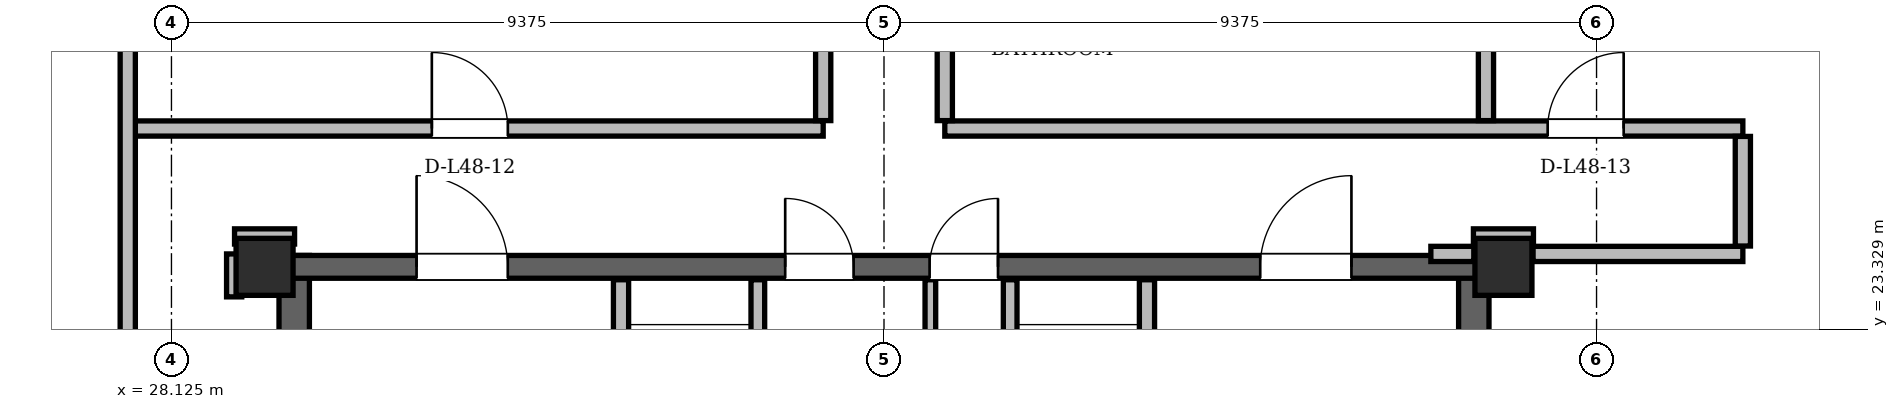
"""IFC4 building model, lengths in metres.
Left out: names, types, materials, properties, quantities, classifications, styles, units other than length and angle.
Written with IfcOpenShell. Run it as: python <this file> out.ifc"""

import sys

from ifc_helpers import new_model, si_unit, direction, frame, frame_2d, origin, origin_2d, place, context, subcontext, project, spatial, rectangle, hollow_rectangle, extrude, element, fill, save


model = new_model("IFC4")
c1 = context("Model", 3, precision=1e-05, world=origin(), true_north=direction((0.0, 1.0)))
c2 = subcontext(c1, "Body", "Model", "MODEL_VIEW")
j1 = project(units=[si_unit("LENGTHUNIT", "METRE"), si_unit("PLANEANGLEUNIT", "RADIAN")], contexts=[c1])
p1 = place(None, origin())
s1 = spatial("IfcSite", under=j1, at=p1, CompositionType="ELEMENT")
p2 = place(p1, origin())
s2 = spatial("IfcBuilding", under=s1, at=p2, CompositionType="ELEMENT")
p3 = place(p2, frame((0.0, 0.0, 181.8)))
s3 = spatial("IfcBuildingStorey", under=s2, at=p3, CompositionType="ELEMENT", Elevation=181.8)
for number, where, z_axis, x_axis in (
    (1, (45.65, 24.15, 0.0), (0.0, 0.0, 1.0), (1.0, 0.0, 0.0)),
    (2, (29.35, 24.15, 0.0), (0.0, 0.0, 1.0), (1.0, 0.0, 0.0)),
):
    element("IfcColumn", number, at=place(p3, frame(where, z_axis=z_axis, x_axis=x_axis)), inside=s3, PredefinedType="COLUMN", context=c2, shape_type="SweptSolid", body=[
        extrude(hollow_rectangle(XDim=0.75, YDim=0.75, WallThickness=0.06, at=origin_2d()), origin(), (0.0, 0.0, 1.0), 3.6),
    ])
for number, where, z_axis, x_axis in (
    (3, (29.74, 11.0, 0.0), (0.0, 0.0, 1.0), (0.0, 1.0, 0.0)),
    (4, (45.26, 11.0, 0.0), (0.0, 0.0, 1.0), (0.0, 1.0, 0.0)),
):
    element("IfcWall", number, at=place(p3, frame(where, z_axis=z_axis, x_axis=x_axis)), inside=s3, PredefinedType="SHEAR", context=c2, shape_type="SweptSolid", body=[
        extrude(rectangle(XDim=13.3, YDim=0.4, at=frame_2d((6.65, 0.0))), origin(), (0.0, 0.0, 1.0), 3.38),
    ])
p4 = place(p3, frame((29.65, 24.15, 0.0), z_axis=(0.0, 0.0, 1.0), x_axis=(1.0, 0.0, 0.0)))
e5 = element("IfcWall", 5, at=p4, inside=s3, PredefinedType="SHEAR", context=c2, shape_type="SweptSolid", body=[
    extrude(rectangle(XDim=15.7, YDim=0.3, at=frame_2d((7.85, 0.0))), origin(), (0.0, 0.0, 1.0), 3.38),
])
p5 = place(p4, frame((1.7, 0.0, 0.0)))
e6 = element("IfcOpeningElement", 6, at=p5, cuts=e5, PredefinedType="OPENING", context=c2, shape_type="SweptSolid", body=[
    extrude(rectangle(XDim=1.2, YDim=2.2, at=frame_2d((0.6, 1.1))), frame((0.0, 0.15, 0.0), z_axis=(0.0, -1.0, 0.0), x_axis=(1.0, 0.0, 0.0)), (0.0, 0.0, 1.0), 0.3),
])
p6 = place(p4, frame((12.8, 0.0, 0.0)))
e7 = element("IfcOpeningElement", 7, at=p6, cuts=e5, PredefinedType="OPENING", context=c2, shape_type="SweptSolid", body=[
    extrude(rectangle(XDim=1.2, YDim=2.2, at=frame_2d((0.6, 1.1))), frame((0.0, 0.15, 0.0), z_axis=(0.0, -1.0, 0.0), x_axis=(1.0, 0.0, 0.0)), (0.0, 0.0, 1.0), 0.3),
])
p7 = place(p4, frame((6.55, 0.0, 0.0)))
e8 = element("IfcOpeningElement", 8, at=p7, cuts=e5, PredefinedType="OPENING", context=c2, shape_type="SweptSolid", body=[
    extrude(rectangle(XDim=0.9, YDim=2.05, at=frame_2d((0.45, 1.025))), frame((0.0, 0.15, 0.0), z_axis=(0.0, -1.0, 0.0), x_axis=(1.0, 0.0, 0.0)), (0.0, 0.0, 1.0), 0.3),
])
p8 = place(p4, frame((8.45, 0.0, 0.0)))
e9 = element("IfcOpeningElement", 9, at=p8, cuts=e5, PredefinedType="OPENING", context=c2, shape_type="SweptSolid", body=[
    extrude(rectangle(XDim=0.9, YDim=2.05, at=frame_2d((0.45, 1.025))), frame((0.0, 0.15, 0.0), z_axis=(0.0, -1.0, 0.0), x_axis=(1.0, 0.0, 0.0)), (0.0, 0.0, 1.0), 0.3),
])
p9 = place(p3, frame((59.565, 12.024, 0.0), z_axis=(0.0, 0.0, 1.0), x_axis=(-0.499997559055, 0.86602681306, 0.0)))
e10 = element("IfcWall", 10, at=p9, inside=s3, PredefinedType="SOLIDWALL", context=c2, shape_type="SweptSolid", body=[
    extrude(rectangle(XDim=36.054, YDim=0.29, at=frame_2d((18.027, 0.0))), origin(), (0.0, 0.0, 1.0), 2.6),
])
p10 = place(p9, frame((3.429, 0.0, 0.0)))
e11 = element("IfcOpeningElement", 11, at=p10, cuts=e10, PredefinedType="OPENING", context=c2, shape_type="SweptSolid", body=[
    extrude(rectangle(XDim=1.5, YDim=2.2, at=frame_2d((0.75, 1.1))), frame((0.0, 0.145, 0.0), z_axis=(0.0, -1.0, 0.0), x_axis=(1.0, 0.0, 0.0)), (0.0, 0.0, 1.0), 0.29),
])
p11 = place(p9, frame((27.779, 0.0, 0.0)))
e12 = element("IfcOpeningElement", 12, at=p11, cuts=e10, PredefinedType="OPENING", context=c2, shape_type="SweptSolid", body=[
    extrude(rectangle(XDim=1.5, YDim=2.2, at=frame_2d((0.75, 1.1))), frame((0.0, 0.145, 0.0), z_axis=(0.0, -1.0, 0.0), x_axis=(1.0, 0.0, 0.0)), (0.0, 0.0, 1.0), 0.29),
])
p12 = place(p9, frame((1.672, 0.0, 0.85)))
e13 = element("IfcOpeningElement", 13, at=p12, cuts=e10, PredefinedType="OPENING", context=c2, shape_type="SweptSolid", body=[
    extrude(rectangle(XDim=1.2, YDim=1.48, at=frame_2d((0.6, 0.74))), frame((0.0, 0.145, 0.0), z_axis=(0.0, -1.0, 0.0), x_axis=(1.0, 0.0, 0.0)), (0.0, 0.0, 1.0), 0.29),
])
p13 = place(p9, frame((14.332, 0.0, 0.85)))
e14 = element("IfcOpeningElement", 14, at=p13, cuts=e10, PredefinedType="OPENING", context=c2, shape_type="SweptSolid", body=[
    extrude(rectangle(XDim=1.2, YDim=1.48, at=frame_2d((0.6, 0.74))), frame((0.0, 0.145, 0.0), z_axis=(0.0, -1.0, 0.0), x_axis=(1.0, 0.0, 0.0)), (0.0, 0.0, 1.0), 0.29),
])
p14 = place(p9, frame((21.605, 0.0, 0.85)))
e15 = element("IfcOpeningElement", 15, at=p14, cuts=e10, PredefinedType="OPENING", context=c2, shape_type="SweptSolid", body=[
    extrude(rectangle(XDim=2.8, YDim=1.64, at=frame_2d((1.4, 0.82))), frame((0.0, 0.145, 0.0), z_axis=(0.0, -1.0, 0.0), x_axis=(1.0, 0.0, 0.0)), (0.0, 0.0, 1.0), 0.29),
])
p15 = place(p9, frame((7.301, 0.0, 0.85)))
e16 = element("IfcOpeningElement", 16, at=p15, cuts=e10, PredefinedType="OPENING", context=c2, shape_type="SweptSolid", body=[
    extrude(rectangle(XDim=1.2, YDim=1.48, at=frame_2d((0.6, 0.74))), frame((0.0, 0.145, 0.0), z_axis=(0.0, -1.0, 0.0), x_axis=(1.0, 0.0, 0.0)), (0.0, 0.0, 1.0), 0.29),
])
p16 = place(p9, frame((25.885, 0.0, 0.85)))
e17 = element("IfcOpeningElement", 17, at=p16, cuts=e10, PredefinedType="OPENING", context=c2, shape_type="SweptSolid", body=[
    extrude(rectangle(XDim=1.2, YDim=1.48, at=frame_2d((0.6, 0.74))), frame((0.0, 0.145, 0.0), z_axis=(0.0, -1.0, 0.0), x_axis=(1.0, 0.0, 0.0)), (0.0, 0.0, 1.0), 0.29),
])
p17 = place(p9, frame((32.282, 0.0, 0.85)))
e18 = element("IfcOpeningElement", 18, at=p17, cuts=e10, PredefinedType="OPENING", context=c2, shape_type="SweptSolid", body=[
    extrude(rectangle(XDim=1.6, YDim=1.64, at=frame_2d((0.8, 0.82))), frame((0.0, 0.145, 0.0), z_axis=(0.0, -1.0, 0.0), x_axis=(1.0, 0.0, 0.0)), (0.0, 0.0, 1.0), 0.29),
])
p18 = place(p3, frame((33.461, 43.247, 0.0), z_axis=(0.0, 0.0, 1.0), x_axis=(-0.499997559055, -0.86602681306, 0.0)))
e19 = element("IfcWall", 19, at=p18, inside=s3, PredefinedType="SOLIDWALL", context=c2, shape_type="SweptSolid", body=[
    extrude(rectangle(XDim=36.054, YDim=0.29, at=frame_2d((18.027, 0.0))), origin(), (0.0, 0.0, 1.0), 2.6),
])
p19 = place(p18, frame((6.579, 0.0, 0.0)))
e20 = element("IfcOpeningElement", 20, at=p19, cuts=e19, PredefinedType="OPENING", context=c2, shape_type="SweptSolid", body=[
    extrude(rectangle(XDim=1.5, YDim=2.2, at=frame_2d((0.75, 1.1))), frame((0.0, 0.145, 0.0), z_axis=(0.0, -1.0, 0.0), x_axis=(1.0, 0.0, 0.0)), (0.0, 0.0, 1.0), 0.29),
])
p20 = place(p18, frame((26.519, 0.0, 0.0)))
e21 = element("IfcOpeningElement", 21, at=p20, cuts=e19, PredefinedType="OPENING", context=c2, shape_type="SweptSolid", body=[
    extrude(rectangle(XDim=1.5, YDim=2.2, at=frame_2d((0.75, 1.1))), frame((0.0, 0.145, 0.0), z_axis=(0.0, -1.0, 0.0), x_axis=(1.0, 0.0, 0.0)), (0.0, 0.0, 1.0), 0.29),
])
p21 = place(p18, frame((33.788, 0.0, 0.85)))
e22 = element("IfcOpeningElement", 22, at=p21, cuts=e19, PredefinedType="OPENING", context=c2, shape_type="SweptSolid", body=[
    extrude(rectangle(XDim=1.2, YDim=1.48, at=frame_2d((0.6, 0.74))), frame((0.0, 0.145, 0.0), z_axis=(0.0, -1.0, 0.0), x_axis=(1.0, 0.0, 0.0)), (0.0, 0.0, 1.0), 0.29),
])
p22 = place(p18, frame((18.57, 0.0, 0.85)))
e23 = element("IfcOpeningElement", 23, at=p22, cuts=e19, PredefinedType="OPENING", context=c2, shape_type="SweptSolid", body=[
    extrude(rectangle(XDim=2.0, YDim=1.64, at=frame_2d((1.0, 0.82))), frame((0.0, 0.145, 0.0), z_axis=(0.0, -1.0, 0.0), x_axis=(1.0, 0.0, 0.0)), (0.0, 0.0, 1.0), 0.29),
])
p23 = place(p18, frame((12.794, 0.0, 0.85)))
e24 = element("IfcOpeningElement", 24, at=p23, cuts=e19, PredefinedType="OPENING", context=c2, shape_type="SweptSolid", body=[
    extrude(rectangle(XDim=1.2, YDim=1.48, at=frame_2d((0.6, 0.74))), frame((0.0, 0.145, 0.0), z_axis=(0.0, -1.0, 0.0), x_axis=(1.0, 0.0, 0.0)), (0.0, 0.0, 1.0), 0.29),
])
p24 = place(p18, frame((15.496, 0.0, 0.85)))
e25 = element("IfcOpeningElement", 25, at=p24, cuts=e19, PredefinedType="OPENING", context=c2, shape_type="SweptSolid", body=[
    extrude(rectangle(XDim=1.2, YDim=1.48, at=frame_2d((0.6, 0.74))), frame((0.0, 0.145, 0.0), z_axis=(0.0, -1.0, 0.0), x_axis=(1.0, 0.0, 0.0)), (0.0, 0.0, 1.0), 0.29),
])
p25 = place(p18, frame((1.108, 0.0, 0.85)))
e26 = element("IfcOpeningElement", 26, at=p25, cuts=e19, PredefinedType="OPENING", context=c2, shape_type="SweptSolid", body=[
    extrude(rectangle(XDim=2.0, YDim=1.64, at=frame_2d((1.0, 0.82))), frame((0.0, 0.145, 0.0), z_axis=(0.0, -1.0, 0.0), x_axis=(1.0, 0.0, 0.0)), (0.0, 0.0, 1.0), 0.29),
])
p26 = place(p3, frame((34.04, 19.48, 0.0), z_axis=(0.0, 0.0, 1.0), x_axis=(0.0, 1.0, 0.0)))
e27 = element("IfcWall", 27, at=p26, inside=s3, PredefinedType="PARTITIONING", context=c2, shape_type="SweptSolid", body=[
    extrude(rectangle(XDim=4.5, YDim=0.2, at=frame_2d((2.25, 0.0))), origin(), (0.0, 0.0, 1.0), 3.38),
])
p27 = place(p26, frame((2.12, 0.0, 0.0)))
e28 = element("IfcOpeningElement", 28, at=p27, cuts=e27, PredefinedType="OPENING", context=c2, shape_type="SweptSolid", body=[
    extrude(rectangle(XDim=1.1, YDim=2.2, at=frame_2d((0.55, 1.1))), frame((0.0, 0.1, 0.0), z_axis=(0.0, -1.0, 0.0), x_axis=(1.0, 0.0, 0.0)), (0.0, 0.0, 1.0), 0.2),
])
p28 = place(p3, frame((35.84, 20.96, 0.0), z_axis=(0.0, 0.0, 1.0), x_axis=(0.0, 1.0, 0.0)))
e29 = element("IfcWall", 29, at=p28, inside=s3, PredefinedType="PARTITIONING", context=c2, shape_type="SweptSolid", body=[
    extrude(rectangle(XDim=3.02, YDim=0.18, at=frame_2d((1.51, 0.0))), origin(), (0.0, 0.0, 1.0), 3.38),
])
p29 = place(p3, frame((40.96, 19.48, 0.0), z_axis=(0.0, 0.0, 1.0), x_axis=(0.0, 1.0, 0.0)))
e30 = element("IfcWall", 30, at=p29, inside=s3, PredefinedType="PARTITIONING", context=c2, shape_type="SweptSolid", body=[
    extrude(rectangle(XDim=4.5, YDim=0.2, at=frame_2d((2.25, 0.0))), origin(), (0.0, 0.0, 1.0), 3.38),
])
p30 = place(p29, frame((2.12, 0.0, 0.0)))
e31 = element("IfcOpeningElement", 31, at=p30, cuts=e30, PredefinedType="OPENING", context=c2, shape_type="SweptSolid", body=[
    extrude(rectangle(XDim=1.1, YDim=2.2, at=frame_2d((0.55, 1.1))), frame((0.0, 0.1, 0.0), z_axis=(0.0, -1.0, 0.0), x_axis=(1.0, 0.0, 0.0)), (0.0, 0.0, 1.0), 0.2),
])
p31 = place(p3, frame((39.16, 20.96, 0.0), z_axis=(0.0, 0.0, 1.0), x_axis=(0.0, 1.0, 0.0)))
e32 = element("IfcWall", 32, at=p31, inside=s3, PredefinedType="PARTITIONING", context=c2, shape_type="SweptSolid", body=[
    extrude(rectangle(XDim=3.02, YDim=0.18, at=frame_2d((1.51, 0.0))), origin(), (0.0, 0.0, 1.0), 3.38),
])
p32 = place(p3, frame((38.11, 21.06, 0.0), z_axis=(0.0, 0.0, 1.0), x_axis=(0.0, 1.0, 0.0)))
e33 = element("IfcWall", 33, at=p32, inside=s3, PredefinedType="PARTITIONING", context=c2, shape_type="SweptSolid", body=[
    extrude(rectangle(XDim=2.92, YDim=0.14, at=frame_2d((1.46, 0.0))), origin(), (0.0, 0.0, 1.0), 3.38),
])
p33 = place(p3, frame((44.695, 24.32, 0.0), z_axis=(0.0, 0.0, 1.0), x_axis=(1.0, 0.0, 0.0)))
e34 = element("IfcWall", 34, at=p33, inside=s3, PredefinedType="PARTITIONING", context=c2, shape_type="SweptSolid", body=[
    extrude(rectangle(XDim=0.565, YDim=0.2, at=frame_2d((0.282, 0.0))), origin(), (0.0, 0.0, 1.0), 2.52),
])
p34 = place(p3, frame((46.04, 24.32, 0.0), z_axis=(0.0, 0.0, 1.0), x_axis=(1.0, 0.0, 0.0)))
e35 = element("IfcWall", 35, at=p34, inside=s3, PredefinedType="PARTITIONING", context=c2, shape_type="SweptSolid", body=[
    extrude(rectangle(XDim=2.76, YDim=0.2, at=frame_2d((1.38, 0.0))), origin(), (0.0, 0.0, 1.0), 3.38),
])
for number, where, z_axis, x_axis in (
    (36, (28.955, 24.55, 0.0), (0.0, 0.0, 1.0), (1.0, 0.0, 0.0)),
    (37, (45.255, 24.55, 0.0), (0.0, 0.0, 1.0), (1.0, 0.0, 0.0)),
):
    element("IfcWall", number, at=place(p3, frame(where, z_axis=z_axis, x_axis=x_axis)), inside=s3, PredefinedType="PARTITIONING", context=c2, shape_type="SweptSolid", body=[
        extrude(rectangle(XDim=0.79, YDim=0.2, at=frame_2d((0.395, 0.0))), origin(), (0.0, 0.0, 1.0), 2.842),
    ])
p35 = place(p3, frame((27.55, 25.97, 0.0), z_axis=(0.0, 0.0, 1.0), x_axis=(1.0, 0.0, 0.0)))
e38 = element("IfcWall", 38, at=p35, inside=s3, PredefinedType="PARTITIONING", context=c2, shape_type="SweptSolid", body=[
    extrude(rectangle(XDim=9.15, YDim=0.2, at=frame_2d((4.575, 0.0))), origin(), (0.0, 0.0, 1.0), 2.842),
])
p36 = place(p35, frame((4.001, 0.0, 0.0)))
e39 = element("IfcOpeningElement", 39, at=p36, cuts=e38, PredefinedType="OPENING", context=c2, shape_type="SweptSolid", body=[
    extrude(rectangle(XDim=1.0, YDim=2.18, at=frame_2d((0.5, 1.09))), frame((0.0, 0.1, 0.0), z_axis=(0.0, -1.0, 0.0), x_axis=(1.0, 0.0, 0.0)), (0.0, 0.0, 1.0), 0.2),
])
p37 = place(p3, frame((38.3, 25.97, 0.0), z_axis=(0.0, 0.0, 1.0), x_axis=(1.0, 0.0, 0.0)))
e40 = element("IfcWall", 40, at=p37, inside=s3, PredefinedType="PARTITIONING", context=c2, shape_type="SweptSolid", body=[
    extrude(rectangle(XDim=10.5, YDim=0.2, at=frame_2d((5.25, 0.0))), origin(), (0.0, 0.0, 1.0), 2.842),
])
p38 = place(p37, frame((7.932, 0.0, 0.0)))
e41 = element("IfcOpeningElement", 41, at=p38, cuts=e40, PredefinedType="OPENING", context=c2, shape_type="SweptSolid", body=[
    extrude(rectangle(XDim=1.0, YDim=2.18, at=frame_2d((0.5, 1.09))), frame((0.0, 0.1, 0.0), z_axis=(0.0, -1.0, 0.0), x_axis=(1.0, 0.0, 0.0)), (0.0, 0.0, 1.0), 0.2),
])
p39 = place(p3, frame((27.55, 18.554, 0.0), z_axis=(0.0, 0.0, 1.0), x_axis=(0.0, 1.0, 0.0)))
e42 = element("IfcWall", 42, at=p39, inside=s3, PredefinedType="PARTITIONING", context=c2, shape_type="SweptSolid", body=[
    extrude(rectangle(XDim=14.156, YDim=0.2, at=frame_2d((7.078, 0.0))), origin(), (0.0, 0.0, 1.0), 2.6),
])
p40 = place(p39, frame((2.257, 0.0, 0.0)))
e43 = element("IfcOpeningElement", 43, at=p40, cuts=e42, PredefinedType="OPENING", context=c2, shape_type="SweptSolid", body=[
    extrude(rectangle(XDim=1.0, YDim=2.18, at=frame_2d((0.5, 1.09))), frame((0.0, 0.1, 0.0), z_axis=(0.0, -1.0, 0.0), x_axis=(1.0, 0.0, 0.0)), (0.0, 0.0, 1.0), 0.2),
])
p41 = place(p3, frame((28.95, 23.755, 0.0), z_axis=(0.0, 0.0, 1.0), x_axis=(0.0, 1.0, 0.0)))
e44 = element("IfcWall", 44, at=p41, inside=s3, PredefinedType="PARTITIONING", context=c2, shape_type="SweptSolid", body=[
    extrude(rectangle(XDim=0.565, YDim=0.2, at=frame_2d((0.283, 0.0))), origin(), (0.0, 0.0, 1.0), 3.38),
])
p42 = place(p3, frame((36.7, 26.074, 0.0), z_axis=(0.0, 0.0, 1.0), x_axis=(0.0, 1.0, 0.0)))
e45 = element("IfcWall", 45, at=p42, inside=s3, PredefinedType="PARTITIONING", context=c2, shape_type="SweptSolid", body=[
    extrude(rectangle(XDim=17.024, YDim=0.2, at=frame_2d((8.512, 0.0))), origin(), (0.0, 0.0, 1.0), 3.38),
])
p43 = place(p3, frame((38.3, 26.074, 0.0), z_axis=(0.0, 0.0, 1.0), x_axis=(0.0, 1.0, 0.0)))
e46 = element("IfcWall", 46, at=p43, inside=s3, PredefinedType="PARTITIONING", context=c2, shape_type="SweptSolid", body=[
    extrude(rectangle(XDim=6.022, YDim=0.2, at=frame_2d((3.011, 0.0))), origin(), (0.0, 0.0, 1.0), 3.38),
])
p44 = place(p43, frame((3.804, 0.0, 0.0)))
e47 = element("IfcOpeningElement", 47, at=p44, cuts=e46, PredefinedType="OPENING", context=c2, shape_type="SweptSolid", body=[
    extrude(rectangle(XDim=1.0, YDim=2.18, at=frame_2d((0.5, 1.09))), frame((0.0, 0.1, 0.0), z_axis=(0.0, -1.0, 0.0), x_axis=(1.0, 0.0, 0.0)), (0.0, 0.0, 1.0), 0.2),
])
p45 = place(p3, frame((45.42, 26.074, 0.0), z_axis=(0.0, 0.0, 1.0), x_axis=(0.0, 1.0, 0.0)))
e48 = element("IfcWall", 48, at=p45, inside=s3, PredefinedType="PARTITIONING", context=c2, shape_type="SweptSolid", body=[
    extrude(rectangle(XDim=10.152, YDim=0.2, at=frame_2d((5.076, 0.0))), origin(), (0.0, 0.0, 1.0), 2.6),
])
p46 = place(p3, frame((48.8, 24.424, 0.0), z_axis=(0.0, 0.0, 1.0), x_axis=(0.0, 1.0, 0.0)))
e49 = element("IfcWall", 49, at=p46, inside=s3, PredefinedType="PARTITIONING", context=c2, shape_type="SweptSolid", body=[
    extrude(rectangle(XDim=1.442, YDim=0.2, at=frame_2d((0.721, 0.0))), origin(), (0.0, 0.0, 1.0), 3.38),
])
p47 = place(p5, origin())
e50 = element("IfcDoor", 50, at=p47, inside=s3, OperationType="SINGLE_SWING_LEFT", PredefinedType="DOOR", context=c2, shape_type="SweptSolid", body=[
    extrude(rectangle(XDim=1.2, YDim=2.2, at=frame_2d((0.6, 1.1))), frame((0.0, 0.025, 0.0), z_axis=(0.0, -1.0, 0.0), x_axis=(1.0, 0.0, 0.0)), (0.0, 0.0, 1.0), 0.05),
])
fill(e6, e50)
p48 = place(p6, origin())
e51 = element("IfcDoor", 51, at=p48, inside=s3, OperationType="SINGLE_SWING_RIGHT", PredefinedType="DOOR", context=c2, shape_type="SweptSolid", body=[
    extrude(rectangle(XDim=1.2, YDim=2.2, at=frame_2d((0.6, 1.1))), frame((0.0, 0.025, 0.0), z_axis=(0.0, -1.0, 0.0), x_axis=(1.0, 0.0, 0.0)), (0.0, 0.0, 1.0), 0.05),
])
fill(e7, e51)
p49 = place(p7, origin())
e52 = element("IfcDoor", 52, at=p49, inside=s3, OperationType="SINGLE_SWING_LEFT", PredefinedType="DOOR", context=c2, shape_type="SweptSolid", body=[
    extrude(rectangle(XDim=0.9, YDim=2.05, at=frame_2d((0.45, 1.025))), frame((0.0, 0.025, 0.0), z_axis=(0.0, -1.0, 0.0), x_axis=(1.0, 0.0, 0.0)), (0.0, 0.0, 1.0), 0.05),
])
fill(e8, e52)
p50 = place(p8, origin())
e53 = element("IfcDoor", 53, at=p50, inside=s3, OperationType="SINGLE_SWING_RIGHT", PredefinedType="DOOR", context=c2, shape_type="SweptSolid", body=[
    extrude(rectangle(XDim=0.9, YDim=2.05, at=frame_2d((0.45, 1.025))), frame((0.0, 0.025, 0.0), z_axis=(0.0, -1.0, 0.0), x_axis=(1.0, 0.0, 0.0)), (0.0, 0.0, 1.0), 0.05),
])
fill(e9, e53)
p51 = place(p36, origin())
e54 = element("IfcDoor", 54, at=p51, inside=s3, OperationType="SINGLE_SWING_LEFT", PredefinedType="DOOR", context=c2, shape_type="SweptSolid", body=[
    extrude(rectangle(XDim=1.0, YDim=2.18, at=frame_2d((0.5, 1.09))), frame((0.0, 0.025, 0.0), z_axis=(0.0, -1.0, 0.0), x_axis=(1.0, 0.0, 0.0)), (0.0, 0.0, 1.0), 0.05),
])
fill(e39, e54)
p52 = place(p38, origin())
e55 = element("IfcDoor", 55, at=p52, inside=s3, OperationType="SINGLE_SWING_RIGHT", PredefinedType="DOOR", context=c2, shape_type="SweptSolid", body=[
    extrude(rectangle(XDim=1.0, YDim=2.18, at=frame_2d((0.5, 1.09))), frame((0.0, 0.025, 0.0), z_axis=(0.0, -1.0, 0.0), x_axis=(1.0, 0.0, 0.0)), (0.0, 0.0, 1.0), 0.05),
])
fill(e41, e55)
save(model, sys.argv[1])
